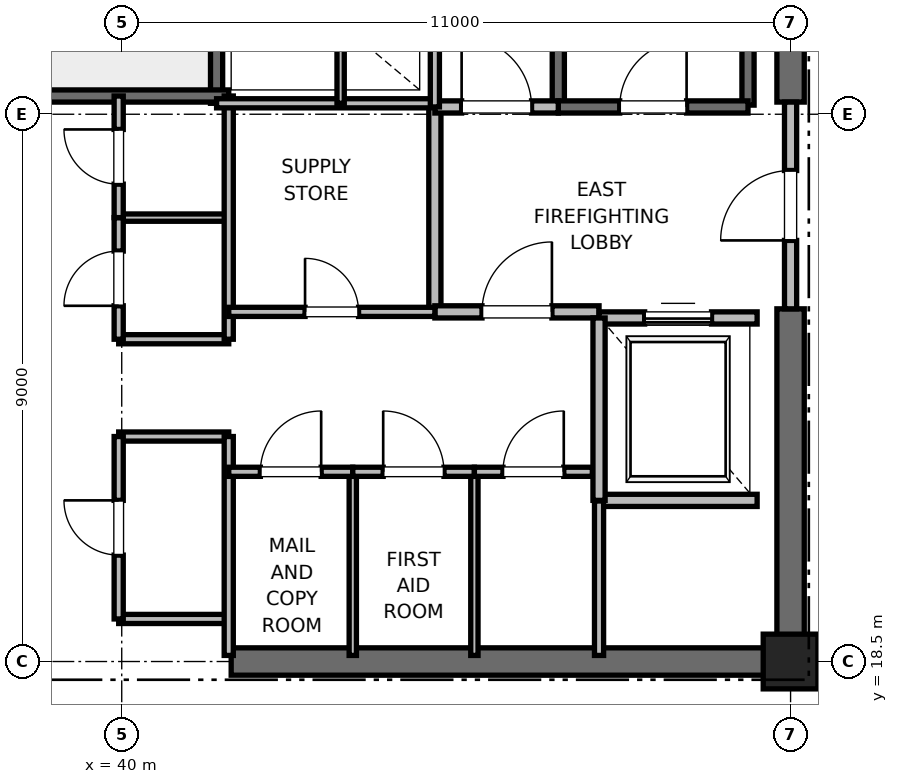
"""IFC4 building model, lengths in metres.
Left out: names, types, materials, properties, quantities, classifications, styles, units other than length and angle.
Written with IfcOpenShell. Run it as: python <this file> out.ifc"""

import sys

from ifc_helpers import new_model, si_unit, direction, frame, frame_2d, origin, origin_2d, place, context, subcontext, project, spatial, rectangle, extrude, element, fill, save


model = new_model("IFC4")
c1 = context("Model", 3, precision=1e-05, world=origin(), true_north=direction((0.0, 1.0)))
c2 = subcontext(c1, "Body", "Model", "MODEL_VIEW")
j1 = project(units=[si_unit("LENGTHUNIT", "METRE"), si_unit("PLANEANGLEUNIT", "RADIAN")], contexts=[c1])
p1 = place(None, origin())
s1 = spatial("IfcSite", under=j1, at=p1, CompositionType="ELEMENT")
p2 = place(p1, origin())
s2 = spatial("IfcBuilding", under=s1, at=p2, CompositionType="ELEMENT")
p3 = place(p2, frame((0.0, 0.0, 259.2)))
s3 = spatial("IfcBuildingStorey", under=s2, at=p3, CompositionType="ELEMENT", Elevation=259.2)
p4 = place(p3, frame((51.0, 18.5, 0.0), z_axis=(0.0, 0.0, 1.0), x_axis=(1.0, 0.0, 0.0)))
e1 = element("IfcColumn", 1, at=p4, inside=s3, PredefinedType="PILASTER", context=c2, shape_type="SweptSolid", body=[
    extrude(rectangle(XDim=0.9, YDim=0.9, at=origin_2d()), origin(), (0.0, 0.0, 1.0), 4.0),
])
p5 = place(p3, frame((41.8, 18.5, 0.0), z_axis=(0.0, 0.0, 1.0), x_axis=(1.0, 0.0, 0.0)))
e2 = element("IfcWall", 2, at=p5, inside=s3, PredefinedType="SHEAR", context=c2, shape_type="SweptSolid", body=[
    extrude(rectangle(XDim=9.2, YDim=0.45, at=frame_2d((4.6, 0.0))), origin(), (0.0, 0.0, 1.0), 3.785),
])
p6 = place(p3, frame((51.0, 18.5, 0.0), z_axis=(0.0, 0.0, 1.0), x_axis=(0.0, 1.0, 0.0)))
e3 = element("IfcWall", 3, at=p6, inside=s3, PredefinedType="SHEAR", context=c2, shape_type="SweptSolid", body=[
    extrude(rectangle(XDim=5.8, YDim=0.45, at=frame_2d((2.9, 0.0))), origin(), (0.0, 0.0, 1.0), 3.785),
])
p7 = place(p3, frame((51.0, 27.7, 0.0), z_axis=(0.0, 0.0, 1.0), x_axis=(0.0, 1.0, 0.0)))
e4 = element("IfcWall", 4, at=p7, inside=s3, PredefinedType="SHEAR", context=c2, shape_type="SweptSolid", body=[
    extrude(rectangle(XDim=8.8, YDim=0.45, at=frame_2d((4.4, 0.0))), origin(), (0.0, 0.0, 1.0), 3.785),
])
p8 = place(p3, frame((50.3, 27.65, 0.0), z_axis=(0.0, 0.0, 1.0), x_axis=(0.0, 1.0, 0.0)))
e5 = element("IfcWall", 5, at=p8, inside=s3, PredefinedType="SOLIDWALL", context=c2, shape_type="SweptSolid", body=[
    extrude(rectangle(XDim=8.15, YDim=0.2, at=frame_2d((4.075, 0.0))), origin(), (0.0, 0.0, 1.0), 3.785),
])
p9 = place(p3, frame((47.18, 27.62, 0.0), z_axis=(0.0, 0.0, 1.0), x_axis=(0.0, 1.0, 0.0)))
e6 = element("IfcWall", 6, at=p9, inside=s3, PredefinedType="SOLIDWALL", context=c2, shape_type="SweptSolid", body=[
    extrude(rectangle(XDim=8.18, YDim=0.2, at=frame_2d((4.09, 0.0))), origin(), (0.0, 0.0, 1.0), 3.785),
])
p10 = place(p3, frame((47.18, 27.62, 0.0), z_axis=(0.0, 0.0, 1.0), x_axis=(1.0, 0.0, 0.0)))
e7 = element("IfcWall", 7, at=p10, inside=s3, PredefinedType="SOLIDWALL", context=c2, shape_type="SweptSolid", body=[
    extrude(rectangle(XDim=3.12, YDim=0.2, at=frame_2d((1.56, 0.0))), origin(), (0.0, 0.0, 1.0), 3.785),
])
p11 = place(p10, frame((1.01, 0.0, 0.0)))
e8 = element("IfcOpeningElement", 8, at=p11, cuts=e7, PredefinedType="OPENING", context=c2, shape_type="SweptSolid", body=[
    extrude(rectangle(XDim=1.1, YDim=2.15, at=frame_2d((0.55, 1.075))), frame((0.0, 0.1, 0.0), z_axis=(0.0, -1.0, 0.0), x_axis=(1.0, 0.0, 0.0)), (0.0, 0.0, 1.0), 0.2),
])
p12 = place(p3, frame((41.56, 27.68, 0.0), z_axis=(0.0, 0.0, 1.0), x_axis=(0.0, 1.0, 0.0)))
e9 = element("IfcWall", 9, at=p12, inside=s3, PredefinedType="SOLIDWALL", context=c2, shape_type="SweptSolid", body=[
    extrude(rectangle(XDim=8.57, YDim=0.2, at=frame_2d((4.285, 0.0))), origin(), (0.0, 0.0, 1.0), 3.785),
])
p13 = place(p3, frame((38.44, 27.8, 0.0), z_axis=(0.0, 0.0, 1.0), x_axis=(1.0, 0.0, 0.0)))
e10 = element("IfcWall", 10, at=p13, inside=s3, PredefinedType="SOLIDWALL", context=c2, shape_type="SweptSolid", body=[
    extrude(rectangle(XDim=3.32, YDim=0.2, at=frame_2d((1.66, 0.0))), origin(), (0.0, 0.0, 1.0), 3.785),
])
p14 = place(p3, frame((45.15, 24.25, 0.0), z_axis=(0.0, 0.0, 1.0), x_axis=(0.0, 1.0, 0.0)))
e11 = element("IfcWall", 11, at=p14, inside=s3, PredefinedType="PARTITIONING", context=c2, shape_type="SweptSolid", body=[
    extrude(rectangle(XDim=3.37, YDim=0.2, at=frame_2d((1.685, 0.0))), origin(), (0.0, 0.0, 1.0), 3.785),
])
p15 = place(p3, frame((45.15, 24.25, 0.0), z_axis=(0.0, 0.0, 1.0), x_axis=(1.0, 0.0, 0.0)))
e12 = element("IfcWall", 12, at=p15, inside=s3, PredefinedType="PARTITIONING", context=c2, shape_type="SweptSolid", body=[
    extrude(rectangle(XDim=2.7, YDim=0.2, at=frame_2d((1.35, 0.0))), origin(), (0.0, 0.0, 1.0), 3.785),
])
p16 = place(p15, frame((0.775, 0.0, 0.0)))
e13 = element("IfcOpeningElement", 13, at=p16, cuts=e12, PredefinedType="OPENING", context=c2, shape_type="SweptSolid", body=[
    extrude(rectangle(XDim=1.15, YDim=2.2, at=frame_2d((0.575, 1.1))), frame((0.0, 0.1, 0.0), z_axis=(0.0, -1.0, 0.0), x_axis=(1.0, 0.0, 0.0)), (0.0, 0.0, 1.0), 0.2),
])
p17 = place(p3, frame((45.15, 27.62, 0.0), z_axis=(0.0, 0.0, 1.0), x_axis=(1.0, 0.0, 0.0)))
e14 = element("IfcWall", 14, at=p17, inside=s3, PredefinedType="PARTITIONING", context=c2, shape_type="SweptSolid", body=[
    extrude(rectangle(XDim=2.03, YDim=0.2, at=frame_2d((1.015, 0.0))), origin(), (0.0, 0.0, 1.0), 3.785),
])
p18 = place(p17, frame((0.44, 0.0, 0.0)))
e15 = element("IfcOpeningElement", 15, at=p18, cuts=e14, PredefinedType="OPENING", context=c2, shape_type="SweptSolid", body=[
    extrude(rectangle(XDim=1.15, YDim=2.2, at=frame_2d((0.575, 1.1))), frame((0.0, 0.1, 0.0), z_axis=(0.0, -1.0, 0.0), x_axis=(1.0, 0.0, 0.0)), (0.0, 0.0, 1.0), 0.2),
])
p19 = place(p3, frame((51.0, 24.3, 0.0), z_axis=(0.0, 0.0, 1.0), x_axis=(0.0, 1.0, 0.0)))
e16 = element("IfcWall", 16, at=p19, inside=s3, PredefinedType="PARTITIONING", context=c2, shape_type="SweptSolid", body=[
    extrude(rectangle(XDim=3.4, YDim=0.2, at=frame_2d((1.7, 0.0))), origin(), (0.0, 0.0, 1.0), 2.865),
])
p20 = place(p19, frame((1.125, 0.0, 0.0)))
e17 = element("IfcOpeningElement", 17, at=p20, cuts=e16, PredefinedType="OPENING", context=c2, shape_type="SweptSolid", body=[
    extrude(rectangle(XDim=1.15, YDim=2.2, at=frame_2d((0.575, 1.1))), frame((0.0, 0.1, 0.0), z_axis=(0.0, -1.0, 0.0), x_axis=(1.0, 0.0, 0.0)), (0.0, 0.0, 1.0), 0.2),
])
p21 = place(p3, frame((47.85, 21.15, 0.0), z_axis=(0.0, 0.0, 1.0), x_axis=(1.0, 0.0, 0.0)))
e18 = element("IfcWall", 18, at=p21, inside=s3, PredefinedType="SOLIDWALL", context=c2, shape_type="SweptSolid", body=[
    extrude(rectangle(XDim=2.6, YDim=0.2, at=frame_2d((1.3, 0.0))), origin(), (0.0, 0.0, 1.0), 3.785),
])
p22 = place(p3, frame((50.45, 24.15, 0.0), z_axis=(0.0, 0.0, 1.0), x_axis=(-1.0, 0.0, 0.0)))
e19 = element("IfcWall", 19, at=p22, inside=s3, PredefinedType="SOLIDWALL", context=c2, shape_type="SweptSolid", body=[
    extrude(rectangle(XDim=2.6, YDim=0.2, at=frame_2d((1.3, 0.0))), origin(), (0.0, 0.0, 1.0), 2.865),
])
p23 = place(p22, frame((0.75, 0.0, 0.0)))
e20 = element("IfcOpeningElement", 20, at=p23, cuts=e19, PredefinedType="OPENING", context=c2, shape_type="SweptSolid", body=[
    extrude(rectangle(XDim=1.1, YDim=2.2, at=frame_2d((0.55, 1.1))), frame((0.0, 0.1, 0.0), z_axis=(0.0, -1.0, 0.0), x_axis=(1.0, 0.0, 0.0)), (0.0, 0.0, 1.0), 0.2),
])
p24 = place(p3, frame((47.85, 24.15, 0.0), z_axis=(0.0, 0.0, 1.0), x_axis=(0.0, -1.0, 0.0)))
e21 = element("IfcWall", 21, at=p24, inside=s3, PredefinedType="SOLIDWALL", context=c2, shape_type="SweptSolid", body=[
    extrude(rectangle(XDim=3.0, YDim=0.2, at=frame_2d((1.5, 0.0))), origin(), (0.0, 0.0, 1.0), 3.785),
])
for number, where, z_axis, x_axis in (
    (22, (39.95, 19.2, 0.0), (0.0, 0.0, 1.0), (1.0, 0.0, 0.0)),
    (23, (39.95, 22.2, 0.0), (0.0, 0.0, 1.0), (1.0, 0.0, 0.0)),
    (24, (39.95, 23.8, 0.0), (0.0, 0.0, 1.0), (1.0, 0.0, 0.0)),
):
    element("IfcWall", number, at=place(p3, frame(where, z_axis=z_axis, x_axis=x_axis)), inside=s3, PredefinedType="PARTITIONING", context=c2, shape_type="SweptSolid", body=[
        extrude(rectangle(XDim=1.81, YDim=0.15, at=frame_2d((0.905, 0.0))), origin(), (0.0, 0.0, 1.0), 2.85),
    ])
p25 = place(p3, frame((39.95, 25.8, 0.0), z_axis=(0.0, 0.0, 1.0), x_axis=(1.0, 0.0, 0.0)))
e25 = element("IfcWall", 25, at=p25, inside=s3, PredefinedType="PARTITIONING", context=c2, shape_type="SweptSolid", body=[
    extrude(rectangle(XDim=1.81, YDim=0.12, at=frame_2d((0.905, 0.0))), origin(), (0.0, 0.0, 1.0), 2.85),
])
p26 = place(p3, frame((41.76, 18.6, 0.0), z_axis=(0.0, 0.0, 1.0), x_axis=(0.0, 1.0, 0.0)))
e26 = element("IfcWall", 26, at=p26, inside=s3, PredefinedType="PARTITIONING", context=c2, shape_type="SweptSolid", body=[
    extrude(rectangle(XDim=3.6, YDim=0.15, at=frame_2d((1.8, 0.0))), origin(), (0.0, 0.0, 1.0), 2.85),
])
p27 = place(p3, frame((41.76, 23.8, 0.0), z_axis=(0.0, 0.0, 1.0), x_axis=(0.0, 1.0, 0.0)))
e27 = element("IfcWall", 27, at=p27, inside=s3, PredefinedType="PARTITIONING", context=c2, shape_type="SweptSolid", body=[
    extrude(rectangle(XDim=4.0, YDim=0.15, at=frame_2d((2.0, 0.0))), origin(), (0.0, 0.0, 1.0), 2.85),
])
p28 = place(p3, frame((39.95, 19.2, 0.0), z_axis=(0.0, 0.0, 1.0), x_axis=(0.0, 1.0, 0.0)))
e28 = element("IfcWall", 28, at=p28, inside=s3, PredefinedType="PARTITIONING", context=c2, shape_type="SweptSolid", body=[
    extrude(rectangle(XDim=3.0, YDim=0.15, at=frame_2d((1.5, 0.0))), origin(), (0.0, 0.0, 1.0), 2.85),
])
p29 = place(p28, frame((1.05, 0.0, 0.0)))
e29 = element("IfcOpeningElement", 29, at=p29, cuts=e28, PredefinedType="OPENING", context=c2, shape_type="SweptSolid", body=[
    extrude(rectangle(XDim=0.9, YDim=2.1, at=frame_2d((0.45, 1.05))), frame((0.0, 0.075, 0.0), z_axis=(0.0, -1.0, 0.0), x_axis=(1.0, 0.0, 0.0)), (0.0, 0.0, 1.0), 0.15),
])
p30 = place(p3, frame((39.95, 23.8, 0.0), z_axis=(0.0, 0.0, 1.0), x_axis=(0.0, 1.0, 0.0)))
e30 = element("IfcWall", 30, at=p30, inside=s3, PredefinedType="PARTITIONING", context=c2, shape_type="SweptSolid", body=[
    extrude(rectangle(XDim=2.0, YDim=0.15, at=frame_2d((1.0, 0.0))), origin(), (0.0, 0.0, 1.0), 2.85),
])
p31 = place(p30, frame((0.55, 0.0, 0.0)))
e31 = element("IfcOpeningElement", 31, at=p31, cuts=e30, PredefinedType="OPENING", context=c2, shape_type="SweptSolid", body=[
    extrude(rectangle(XDim=0.9, YDim=2.1, at=frame_2d((0.45, 1.05))), frame((0.0, 0.075, 0.0), z_axis=(0.0, -1.0, 0.0), x_axis=(1.0, 0.0, 0.0)), (0.0, 0.0, 1.0), 0.15),
])
p32 = place(p3, frame((39.95, 25.8, 0.0), z_axis=(0.0, 0.0, 1.0), x_axis=(0.0, 1.0, 0.0)))
e32 = element("IfcWall", 32, at=p32, inside=s3, PredefinedType="PARTITIONING", context=c2, shape_type="SweptSolid", body=[
    extrude(rectangle(XDim=2.0, YDim=0.15, at=frame_2d((1.0, 0.0))), origin(), (0.0, 0.0, 1.0), 2.85),
])
p33 = place(p32, frame((0.55, 0.0, 0.0)))
e33 = element("IfcOpeningElement", 33, at=p33, cuts=e32, PredefinedType="OPENING", context=c2, shape_type="SweptSolid", body=[
    extrude(rectangle(XDim=0.9, YDim=2.1, at=frame_2d((0.45, 1.05))), frame((0.0, 0.075, 0.0), z_axis=(0.0, -1.0, 0.0), x_axis=(1.0, 0.0, 0.0)), (0.0, 0.0, 1.0), 0.15),
])
p34 = place(p3, frame((41.56, 27.68, 0.0), z_axis=(0.0, 0.0, 1.0), x_axis=(1.0, 0.0, 0.0)))
e34 = element("IfcWall", 34, at=p34, inside=s3, PredefinedType="PARTITIONING", context=c2, shape_type="SweptSolid", body=[
    extrude(rectangle(XDim=3.59, YDim=0.15, at=frame_2d((1.795, 0.0))), origin(), (0.0, 0.0, 1.0), 2.85),
])
p35 = place(p3, frame((47.85, 18.6, 0.0), z_axis=(0.0, 0.0, 1.0), x_axis=(0.0, 1.0, 0.0)))
e35 = element("IfcWall", 35, at=p35, inside=s3, PredefinedType="PARTITIONING", context=c2, shape_type="SweptSolid", body=[
    extrude(rectangle(XDim=2.54, YDim=0.15, at=frame_2d((1.27, 0.0))), origin(), (0.0, 0.0, 1.0), 2.85),
])
for number, where, z_axis, x_axis in (
    (36, (43.8, 18.6, 0.0), (0.0, 0.0, 1.0), (0.0, 1.0, 0.0)),
    (37, (45.8, 18.6, 0.0), (0.0, 0.0, 1.0), (0.0, 1.0, 0.0)),
):
    element("IfcWall", number, at=place(p3, frame(where, z_axis=z_axis, x_axis=x_axis)), inside=s3, PredefinedType="PARTITIONING", context=c2, shape_type="SweptSolid", body=[
        extrude(rectangle(XDim=3.02, YDim=0.12, at=frame_2d((1.51, 0.0))), origin(), (0.0, 0.0, 1.0), 2.85),
    ])
p36 = place(p3, frame((41.76, 21.62, 0.0), z_axis=(0.0, 0.0, 1.0), x_axis=(1.0, 0.0, 0.0)))
e38 = element("IfcWall", 38, at=p36, inside=s3, PredefinedType="PARTITIONING", context=c2, shape_type="SweptSolid", body=[
    extrude(rectangle(XDim=2.04, YDim=0.15, at=frame_2d((1.02, 0.0))), origin(), (0.0, 0.0, 1.0), 2.85),
])
p37 = place(p36, frame((0.52, 0.0, 0.0)))
e39 = element("IfcOpeningElement", 39, at=p37, cuts=e38, PredefinedType="OPENING", context=c2, shape_type="SweptSolid", body=[
    extrude(rectangle(XDim=1.0, YDim=2.15, at=frame_2d((0.5, 1.075))), frame((0.0, 0.075, 0.0), z_axis=(0.0, -1.0, 0.0), x_axis=(1.0, 0.0, 0.0)), (0.0, 0.0, 1.0), 0.15),
])
p38 = place(p3, frame((43.8, 21.62, 0.0), z_axis=(0.0, 0.0, 1.0), x_axis=(1.0, 0.0, 0.0)))
e40 = element("IfcWall", 40, at=p38, inside=s3, PredefinedType="PARTITIONING", context=c2, shape_type="SweptSolid", body=[
    extrude(rectangle(XDim=2.0, YDim=0.15, at=frame_2d((1.0, 0.0))), origin(), (0.0, 0.0, 1.0), 2.85),
])
p39 = place(p38, frame((0.5, 0.0, 0.0)))
e41 = element("IfcOpeningElement", 41, at=p39, cuts=e40, PredefinedType="OPENING", context=c2, shape_type="SweptSolid", body=[
    extrude(rectangle(XDim=1.0, YDim=2.15, at=frame_2d((0.5, 1.075))), frame((0.0, 0.075, 0.0), z_axis=(0.0, -1.0, 0.0), x_axis=(1.0, 0.0, 0.0)), (0.0, 0.0, 1.0), 0.15),
])
p40 = place(p3, frame((45.8, 21.62, 0.0), z_axis=(0.0, 0.0, 1.0), x_axis=(1.0, 0.0, 0.0)))
e42 = element("IfcWall", 42, at=p40, inside=s3, PredefinedType="PARTITIONING", context=c2, shape_type="SweptSolid", body=[
    extrude(rectangle(XDim=1.94, YDim=0.15, at=frame_2d((0.97, 0.0))), origin(), (0.0, 0.0, 1.0), 2.85),
])
p41 = place(p40, frame((0.47, 0.0, 0.0)))
e43 = element("IfcOpeningElement", 43, at=p41, cuts=e42, PredefinedType="OPENING", context=c2, shape_type="SweptSolid", body=[
    extrude(rectangle(XDim=1.0, YDim=2.15, at=frame_2d((0.5, 1.075))), frame((0.0, 0.075, 0.0), z_axis=(0.0, -1.0, 0.0), x_axis=(1.0, 0.0, 0.0)), (0.0, 0.0, 1.0), 0.15),
])
p42 = place(p3, frame((41.76, 24.25, 0.0), z_axis=(0.0, 0.0, 1.0), x_axis=(1.0, 0.0, 0.0)))
e44 = element("IfcWall", 44, at=p42, inside=s3, PredefinedType="PARTITIONING", context=c2, shape_type="SweptSolid", body=[
    extrude(rectangle(XDim=3.39, YDim=0.15, at=frame_2d((1.695, 0.0))), origin(), (0.0, 0.0, 1.0), 2.85),
])
p43 = place(p42, frame((1.255, 0.0, 0.0)))
e45 = element("IfcOpeningElement", 45, at=p43, cuts=e44, PredefinedType="OPENING", context=c2, shape_type="SweptSolid", body=[
    extrude(rectangle(XDim=0.88, YDim=2.1, at=frame_2d((0.44, 1.05))), frame((0.0, 0.075, 0.0), z_axis=(0.0, -1.0, 0.0), x_axis=(1.0, 0.0, 0.0)), (0.0, 0.0, 1.0), 0.15),
])
p44 = place(p3, frame((45.15, 27.62, 0.0), z_axis=(0.0, 0.0, 1.0), x_axis=(0.0, 1.0, 0.0)))
e46 = element("IfcWall", 46, at=p44, inside=s3, PredefinedType="PARTITIONING", context=c2, shape_type="SweptSolid", body=[
    extrude(rectangle(XDim=3.1, YDim=0.15, at=frame_2d((1.55, 0.0))), origin(), (0.0, 0.0, 1.0), 2.85),
])
p45 = place(p3, frame((43.6, 27.68, 0.0), z_axis=(0.0, 0.0, 1.0), x_axis=(0.0, 1.0, 0.0)))
e47 = element("IfcWall", 47, at=p45, inside=s3, PredefinedType="PARTITIONING", context=c2, shape_type="SweptSolid", body=[
    extrude(rectangle(XDim=3.04, YDim=0.12, at=frame_2d((1.52, 0.0))), origin(), (0.0, 0.0, 1.0), 2.85),
])
p46 = place(p11, origin())
e48 = element("IfcDoor", 48, at=p46, inside=s3, OperationType="SINGLE_SWING_RIGHT", PredefinedType="DOOR", context=c2, shape_type="SweptSolid", body=[
    extrude(rectangle(XDim=1.1, YDim=2.15, at=frame_2d((0.55, 1.075))), frame((0.0, 0.025, 0.0), z_axis=(0.0, -1.0, 0.0), x_axis=(1.0, 0.0, 0.0)), (0.0, 0.0, 1.0), 0.05),
])
fill(e8, e48)
p47 = place(p16, origin())
e49 = element("IfcDoor", 49, at=p47, inside=s3, OperationType="SINGLE_SWING_RIGHT", PredefinedType="DOOR", context=c2, shape_type="SweptSolid", body=[
    extrude(rectangle(XDim=1.15, YDim=2.2, at=frame_2d((0.575, 1.1))), frame((0.0, 0.025, 0.0), z_axis=(0.0, -1.0, 0.0), x_axis=(1.0, 0.0, 0.0)), (0.0, 0.0, 1.0), 0.05),
])
fill(e13, e49)
p48 = place(p18, origin())
e50 = element("IfcDoor", 50, at=p48, inside=s3, OperationType="SINGLE_SWING_LEFT", PredefinedType="DOOR", context=c2, shape_type="SweptSolid", body=[
    extrude(rectangle(XDim=1.15, YDim=2.2, at=frame_2d((0.575, 1.1))), frame((0.0, 0.025, 0.0), z_axis=(0.0, -1.0, 0.0), x_axis=(1.0, 0.0, 0.0)), (0.0, 0.0, 1.0), 0.05),
])
fill(e15, e50)
p49 = place(p20, origin())
e51 = element("IfcDoor", 51, at=p49, inside=s3, OperationType="SINGLE_SWING_LEFT", PredefinedType="DOOR", context=c2, shape_type="SweptSolid", body=[
    extrude(rectangle(XDim=1.15, YDim=2.2, at=frame_2d((0.575, 1.1))), frame((0.0, 0.025, 0.0), z_axis=(0.0, -1.0, 0.0), x_axis=(1.0, 0.0, 0.0)), (0.0, 0.0, 1.0), 0.05),
])
fill(e17, e51)
p50 = place(p23, origin())
e52 = element("IfcDoor", 52, at=p50, inside=s3, OperationType="SLIDING_TO_RIGHT", PredefinedType="DOOR", context=c2, shape_type="SweptSolid", body=[
    extrude(rectangle(XDim=1.1, YDim=2.2, at=frame_2d((0.55, 1.1))), frame((0.0, 0.025, 0.0), z_axis=(0.0, -1.0, 0.0), x_axis=(1.0, 0.0, 0.0)), (0.0, 0.0, 1.0), 0.05),
])
fill(e20, e52)
p51 = place(p29, origin())
e53 = element("IfcDoor", 53, at=p51, inside=s3, OperationType="SINGLE_SWING_RIGHT", PredefinedType="DOOR", context=c2, shape_type="SweptSolid", body=[
    extrude(rectangle(XDim=0.9, YDim=2.1, at=frame_2d((0.45, 1.05))), frame((0.0, 0.025, 0.0), z_axis=(0.0, -1.0, 0.0), x_axis=(1.0, 0.0, 0.0)), (0.0, 0.0, 1.0), 0.05),
])
fill(e29, e53)
p52 = place(p31, origin())
e54 = element("IfcDoor", 54, at=p52, inside=s3, OperationType="SINGLE_SWING_LEFT", PredefinedType="DOOR", context=c2, shape_type="SweptSolid", body=[
    extrude(rectangle(XDim=0.9, YDim=2.1, at=frame_2d((0.45, 1.05))), frame((0.0, 0.025, 0.0), z_axis=(0.0, -1.0, 0.0), x_axis=(1.0, 0.0, 0.0)), (0.0, 0.0, 1.0), 0.05),
])
fill(e31, e54)
p53 = place(p33, origin())
e55 = element("IfcDoor", 55, at=p53, inside=s3, OperationType="SINGLE_SWING_RIGHT", PredefinedType="DOOR", context=c2, shape_type="SweptSolid", body=[
    extrude(rectangle(XDim=0.9, YDim=2.1, at=frame_2d((0.45, 1.05))), frame((0.0, 0.025, 0.0), z_axis=(0.0, -1.0, 0.0), x_axis=(1.0, 0.0, 0.0)), (0.0, 0.0, 1.0), 0.05),
])
fill(e33, e55)
p54 = place(p37, origin())
e56 = element("IfcDoor", 56, at=p54, inside=s3, OperationType="SINGLE_SWING_RIGHT", PredefinedType="DOOR", context=c2, shape_type="SweptSolid", body=[
    extrude(rectangle(XDim=1.0, YDim=2.15, at=frame_2d((0.5, 1.075))), frame((0.0, 0.025, 0.0), z_axis=(0.0, -1.0, 0.0), x_axis=(1.0, 0.0, 0.0)), (0.0, 0.0, 1.0), 0.05),
])
fill(e39, e56)
p55 = place(p39, origin())
e57 = element("IfcDoor", 57, at=p55, inside=s3, OperationType="SINGLE_SWING_LEFT", PredefinedType="DOOR", context=c2, shape_type="SweptSolid", body=[
    extrude(rectangle(XDim=1.0, YDim=2.15, at=frame_2d((0.5, 1.075))), frame((0.0, 0.025, 0.0), z_axis=(0.0, -1.0, 0.0), x_axis=(1.0, 0.0, 0.0)), (0.0, 0.0, 1.0), 0.05),
])
fill(e41, e57)
p56 = place(p41, origin())
e58 = element("IfcDoor", 58, at=p56, inside=s3, OperationType="SINGLE_SWING_RIGHT", PredefinedType="DOOR", context=c2, shape_type="SweptSolid", body=[
    extrude(rectangle(XDim=1.0, YDim=2.15, at=frame_2d((0.5, 1.075))), frame((0.0, 0.025, 0.0), z_axis=(0.0, -1.0, 0.0), x_axis=(1.0, 0.0, 0.0)), (0.0, 0.0, 1.0), 0.05),
])
fill(e43, e58)
p57 = place(p43, origin())
e59 = element("IfcDoor", 59, at=p57, inside=s3, OperationType="SINGLE_SWING_LEFT", PredefinedType="DOOR", context=c2, shape_type="SweptSolid", body=[
    extrude(rectangle(XDim=0.88, YDim=2.1, at=frame_2d((0.44, 1.05))), frame((0.0, 0.025, 0.0), z_axis=(0.0, -1.0, 0.0), x_axis=(1.0, 0.0, 0.0)), (0.0, 0.0, 1.0), 0.05),
])
fill(e45, e59)
save(model, sys.argv[1])
